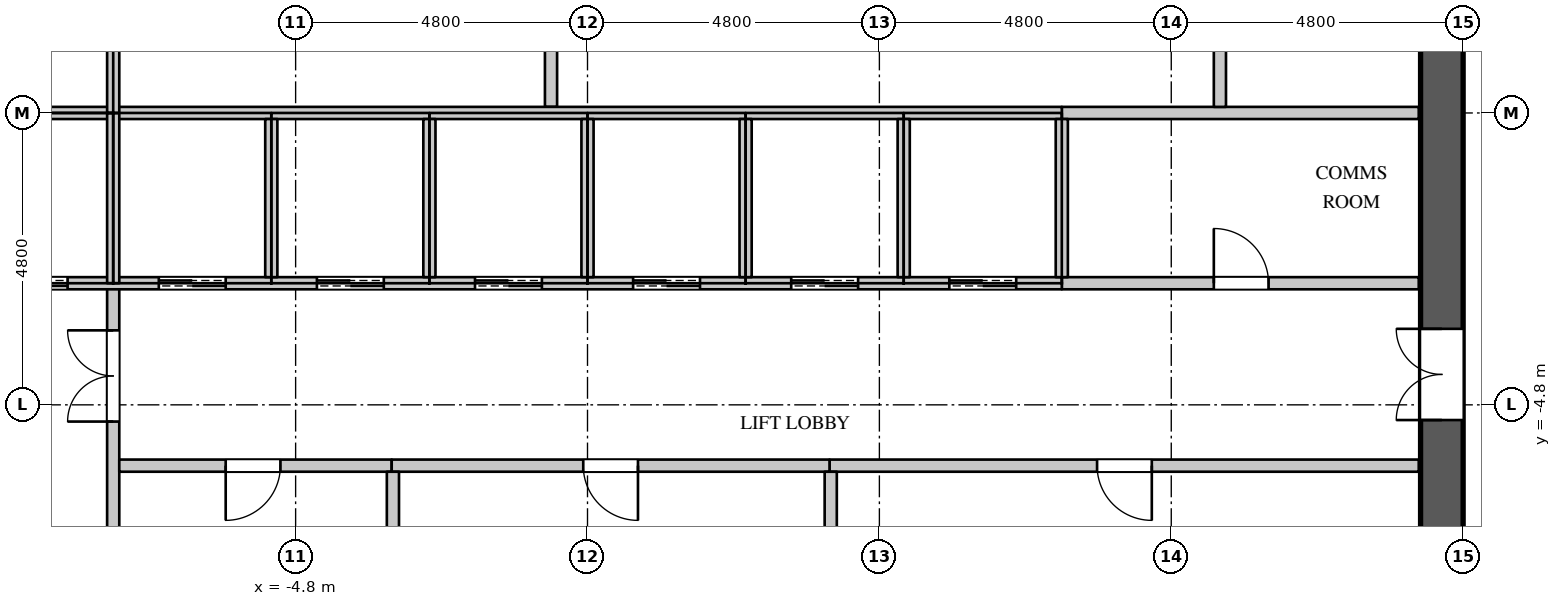
"""IFC4 building model, lengths in metres.
Left out: names, types, materials, properties, quantities, classifications, styles, units other than length and angle.
Written with IfcOpenShell. Run it as: python <this file> out.ifc"""

import sys

from ifc_helpers import new_model, si_unit, direction, frame, frame_2d, origin, place, context, subcontext, project, spatial, rectangle, extrude, element, fill, save


model = new_model("IFC4")
c1 = context("Model", 3, precision=1e-05, world=origin(), true_north=direction((0.0, 1.0)))
c2 = subcontext(c1, "Body", "Model", "MODEL_VIEW")
j1 = project(units=[si_unit("LENGTHUNIT", "METRE"), si_unit("PLANEANGLEUNIT", "RADIAN")], contexts=[c1])
p1 = place(None, origin())
s1 = spatial("IfcSite", under=j1, at=p1, CompositionType="ELEMENT")
p2 = place(p1, origin())
s2 = spatial("IfcBuilding", under=s1, at=p2, CompositionType="ELEMENT")
p3 = place(p2, frame((0.0, 0.0, 204.3)))
s3 = spatial("IfcBuildingStorey", under=s2, at=p3, CompositionType="ELEMENT", Elevation=204.3)
p4 = place(p3, frame((14.05, -11.3, 0.0), z_axis=(0.0, 0.0, 1.0), x_axis=(0.0, 1.0, 0.0)))
e1 = element("IfcWall", 1, at=p4, inside=s3, PredefinedType="SHEAR", context=c2, shape_type="SweptSolid", body=[
    extrude(rectangle(XDim=22.6, YDim=0.7, at=frame_2d((11.3, 0.0))), origin(), (0.0, 0.0, 1.0), 4.2),
])
p5 = place(p4, frame((20.35, 0.0, 0.0)))
e2 = element("IfcOpeningElement", 2, at=p5, cuts=e1, PredefinedType="OPENING", context=c2, shape_type="SweptSolid", body=[
    extrude(rectangle(XDim=1.1, YDim=2.2, at=frame_2d((0.55, 1.1))), frame((0.0, 0.36, 0.0), z_axis=(0.0, -1.0, 0.0), x_axis=(1.0, 0.0, 0.0)), (0.0, 0.0, 1.0), 0.72),
])
p6 = place(p4, frame((1.15, 0.0, 0.0)))
e3 = element("IfcOpeningElement", 3, at=p6, cuts=e1, PredefinedType="OPENING", context=c2, shape_type="SweptSolid", body=[
    extrude(rectangle(XDim=1.1, YDim=2.2, at=frame_2d((0.55, 1.1))), frame((0.0, 0.36, 0.0), z_axis=(0.0, -1.0, 0.0), x_axis=(1.0, 0.0, 0.0)), (0.0, 0.0, 1.0), 0.72),
])
p7 = place(p4, frame((14.85, 0.0, 0.0)))
e4 = element("IfcOpeningElement", 4, at=p7, cuts=e1, PredefinedType="OPENING", context=c2, shape_type="SweptSolid", body=[
    extrude(rectangle(XDim=1.5, YDim=2.4, at=frame_2d((0.75, 1.2))), frame((0.0, 0.36, 0.0), z_axis=(0.0, -1.0, 0.0), x_axis=(1.0, 0.0, 0.0)), (0.0, 0.0, 1.0), 0.72),
])
p8 = place(p4, frame((6.25, 0.0, 0.0)))
e5 = element("IfcOpeningElement", 5, at=p8, cuts=e1, PredefinedType="OPENING", context=c2, shape_type="SweptSolid", body=[
    extrude(rectangle(XDim=1.5, YDim=2.4, at=frame_2d((0.75, 1.2))), frame((0.0, 0.36, 0.0), z_axis=(0.0, -1.0, 0.0), x_axis=(1.0, 0.0, 0.0)), (0.0, 0.0, 1.0), 0.72),
])
p9 = place(p3, frame((-7.8, -8.075, 0.0), z_axis=(0.0, 0.0, 1.0), x_axis=(0.0, 1.0, 0.0)))
e6 = element("IfcWall", 6, at=p9, inside=s3, PredefinedType="PARTITIONING", context=c2, shape_type="SweptSolid", body=[
    extrude(rectangle(XDim=5.275, YDim=0.2, at=frame_2d((2.637, 0.0))), origin(), (0.0, 0.0, 1.0), 3.798),
])
p10 = place(p9, frame((3.0, 0.0, 0.0)))
e7 = element("IfcOpeningElement", 7, at=p10, cuts=e6, PredefinedType="OPENING", context=c2, shape_type="SweptSolid", body=[
    extrude(rectangle(XDim=1.5, YDim=2.4, at=frame_2d((0.75, 1.2))), frame((0.0, 0.11, 0.0), z_axis=(0.0, -1.0, 0.0), x_axis=(1.0, 0.0, 0.0)), (0.0, 0.0, 1.0), 0.22),
])
p11 = place(p3, frame((-7.7, -5.8, 0.0), z_axis=(0.0, 0.0, 1.0), x_axis=(1.0, 0.0, 0.0)))
e8 = element("IfcWall", 8, at=p11, inside=s3, PredefinedType="PARTITIONING", context=c2, shape_type="SweptSolid", body=[
    extrude(rectangle(XDim=4.48, YDim=0.2, at=frame_2d((2.24, 0.0))), origin(), (0.0, 0.0, 1.0), 3.798),
])
p12 = place(p11, frame((1.75, 0.0, 0.0)))
e9 = element("IfcOpeningElement", 9, at=p12, cuts=e8, PredefinedType="OPENING", context=c2, shape_type="SweptSolid", body=[
    extrude(rectangle(XDim=0.9, YDim=2.2, at=frame_2d((0.45, 1.1))), frame((0.0, 0.11, 0.0), z_axis=(0.0, -1.0, 0.0), x_axis=(1.0, 0.0, 0.0)), (0.0, 0.0, 1.0), 0.22),
])
p13 = place(p3, frame((3.98, -5.8, 0.0), z_axis=(0.0, 0.0, 1.0), x_axis=(1.0, 0.0, 0.0)))
e10 = element("IfcWall", 10, at=p13, inside=s3, PredefinedType="PARTITIONING", context=c2, shape_type="SweptSolid", body=[
    extrude(rectangle(XDim=9.69, YDim=0.2, at=frame_2d((4.845, 0.0))), origin(), (0.0, 0.0, 1.0), 3.798),
])
p14 = place(p13, frame((4.4, 0.0, 0.0)))
e11 = element("IfcOpeningElement", 11, at=p14, cuts=e10, PredefinedType="OPENING", context=c2, shape_type="SweptSolid", body=[
    extrude(rectangle(XDim=0.9, YDim=2.2, at=frame_2d((0.45, 1.1))), frame((0.0, 0.11, 0.0), z_axis=(0.0, -1.0, 0.0), x_axis=(1.0, 0.0, 0.0)), (0.0, 0.0, 1.0), 0.22),
])
p15 = place(p3, frame((-3.22, -5.8, 0.0), z_axis=(0.0, 0.0, 1.0), x_axis=(1.0, 0.0, 0.0)))
e12 = element("IfcWall", 12, at=p15, inside=s3, PredefinedType="PARTITIONING", context=c2, shape_type="SweptSolid", body=[
    extrude(rectangle(XDim=7.2, YDim=0.2, at=frame_2d((3.6, 0.0))), origin(), (0.0, 0.0, 1.0), 3.798),
])
p16 = place(p15, frame((3.15, 0.0, 0.0)))
e13 = element("IfcOpeningElement", 13, at=p16, cuts=e12, PredefinedType="OPENING", context=c2, shape_type="SweptSolid", body=[
    extrude(rectangle(XDim=0.9, YDim=2.2, at=frame_2d((0.45, 1.1))), frame((0.0, 0.11, 0.0), z_axis=(0.0, -1.0, 0.0), x_axis=(1.0, 0.0, 0.0)), (0.0, 0.0, 1.0), 0.22),
])
p17 = place(p3, frame((-3.2, -11.27, 0.0), z_axis=(0.0, 0.0, 1.0), x_axis=(0.0, 1.0, 0.0)))
e14 = element("IfcWall", 14, at=p17, inside=s3, PredefinedType="PARTITIONING", context=c2, shape_type="SweptSolid", body=[
    extrude(rectangle(XDim=5.37, YDim=0.2, at=frame_2d((2.685, 0.0))), origin(), (0.0, 0.0, 1.0), 3.798),
])
p18 = place(p3, frame((-0.6, 0.1, 0.0), z_axis=(0.0, 0.0, 1.0), x_axis=(0.0, 1.0, 0.0)))
e15 = element("IfcWall", 15, at=p18, inside=s3, PredefinedType="PARTITIONING", context=c2, shape_type="SweptSolid", body=[
    extrude(rectangle(XDim=2.6, YDim=0.2, at=frame_2d((1.3, 0.0))), origin(), (0.0, 0.0, 1.0), 3.798),
])
p19 = place(p3, frame((4.0, -11.27, 0.0), z_axis=(0.0, 0.0, 1.0), x_axis=(0.0, 1.0, 0.0)))
e16 = element("IfcWall", 16, at=p19, inside=s3, PredefinedType="PARTITIONING", context=c2, shape_type="SweptSolid", body=[
    extrude(rectangle(XDim=5.37, YDim=0.2, at=frame_2d((2.685, 0.0))), origin(), (0.0, 0.0, 1.0), 3.798),
])
p20 = place(p3, frame((7.8, -2.8, 0.0), z_axis=(0.0, 0.0, 1.0), x_axis=(1.0, 0.0, 0.0)))
e17 = element("IfcWall", 17, at=p20, inside=s3, PredefinedType="PARTITIONING", context=c2, shape_type="SweptSolid", body=[
    extrude(rectangle(XDim=5.87, YDim=0.2, at=frame_2d((2.935, 0.0))), origin(), (0.0, 0.0, 1.0), 3.798),
])
p21 = place(p20, frame((2.5, 0.0, 0.0)))
e18 = element("IfcOpeningElement", 18, at=p21, cuts=e17, PredefinedType="OPENING", context=c2, shape_type="SweptSolid", body=[
    extrude(rectangle(XDim=0.9, YDim=2.2, at=frame_2d((0.45, 1.1))), frame((0.0, 0.11, 0.0), z_axis=(0.0, -1.0, 0.0), x_axis=(1.0, 0.0, 0.0)), (0.0, 0.0, 1.0), 0.22),
])
p22 = place(p3, frame((7.8, 0.0, 0.0), z_axis=(0.0, 0.0, 1.0), x_axis=(1.0, 0.0, 0.0)))
e19 = element("IfcWall", 19, at=p22, inside=s3, PredefinedType="PARTITIONING", context=c2, shape_type="SweptSolid", body=[
    extrude(rectangle(XDim=5.87, YDim=0.2, at=frame_2d((2.935, 0.0))), origin(), (0.0, 0.0, 1.0), 3.798),
])
p23 = place(p3, frame((10.4, 0.1, 0.0), z_axis=(0.0, 0.0, 1.0), x_axis=(0.0, 1.0, 0.0)))
e20 = element("IfcWall", 20, at=p23, inside=s3, PredefinedType="PARTITIONING", context=c2, shape_type="SweptSolid", body=[
    extrude(rectangle(XDim=2.6, YDim=0.2, at=frame_2d((1.3, 0.0))), origin(), (0.0, 0.0, 1.0), 3.798),
])
p24 = place(p3, frame((-13.67, 0.0, 0.0), z_axis=(0.0, 0.0, 1.0), x_axis=(1.0, 0.0, 0.0)))
e21 = element("IfcWall", 21, at=p24, inside=s3, PredefinedType="PARTITIONING", context=c2, shape_type="SweptSolid", body=[
    extrude(rectangle(XDim=21.47, YDim=0.2, at=frame_2d((10.735, 0.0))), origin(), (0.0, 0.0, 1.0), 3.798),
])
p25 = place(p3, frame((-10.4, -2.8, 0.0), z_axis=(0.0, 0.0, 1.0), x_axis=(1.0, 0.0, 0.0)))
e22 = element("IfcWall", 22, at=p25, inside=s3, PredefinedType="PARTITIONING", context=c2, shape_type="SweptSolid", body=[
    extrude(rectangle(XDim=18.2, YDim=0.2, at=frame_2d((9.1, 0.0))), origin(), (0.0, 0.0, 1.0), 3.798),
])
p26 = place(p25, frame((0.75, 0.0, 0.0)))
e23 = element("IfcOpeningElement", 23, at=p26, cuts=e22, PredefinedType="OPENING", context=c2, shape_type="SweptSolid", body=[
    extrude(rectangle(XDim=1.1, YDim=2.2, at=frame_2d((0.55, 1.1))), frame((0.0, 0.11, 0.0), z_axis=(0.0, -1.0, 0.0), x_axis=(1.0, 0.0, 0.0)), (0.0, 0.0, 1.0), 0.22),
])
p27 = place(p25, frame((3.35, 0.0, 0.0)))
e24 = element("IfcOpeningElement", 24, at=p27, cuts=e22, PredefinedType="OPENING", context=c2, shape_type="SweptSolid", body=[
    extrude(rectangle(XDim=1.1, YDim=2.2, at=frame_2d((0.55, 1.1))), frame((0.0, 0.11, 0.0), z_axis=(0.0, -1.0, 0.0), x_axis=(1.0, 0.0, 0.0)), (0.0, 0.0, 1.0), 0.22),
])
p28 = place(p25, frame((5.95, 0.0, 0.0)))
e25 = element("IfcOpeningElement", 25, at=p28, cuts=e22, PredefinedType="OPENING", context=c2, shape_type="SweptSolid", body=[
    extrude(rectangle(XDim=1.1, YDim=2.2, at=frame_2d((0.55, 1.1))), frame((0.0, 0.11, 0.0), z_axis=(0.0, -1.0, 0.0), x_axis=(1.0, 0.0, 0.0)), (0.0, 0.0, 1.0), 0.22),
])
p29 = place(p25, frame((8.55, 0.0, 0.0)))
e26 = element("IfcOpeningElement", 26, at=p29, cuts=e22, PredefinedType="OPENING", context=c2, shape_type="SweptSolid", body=[
    extrude(rectangle(XDim=1.1, YDim=2.2, at=frame_2d((0.55, 1.1))), frame((0.0, 0.11, 0.0), z_axis=(0.0, -1.0, 0.0), x_axis=(1.0, 0.0, 0.0)), (0.0, 0.0, 1.0), 0.22),
])
p30 = place(p25, frame((11.15, 0.0, 0.0)))
e27 = element("IfcOpeningElement", 27, at=p30, cuts=e22, PredefinedType="OPENING", context=c2, shape_type="SweptSolid", body=[
    extrude(rectangle(XDim=1.1, YDim=2.2, at=frame_2d((0.55, 1.1))), frame((0.0, 0.11, 0.0), z_axis=(0.0, -1.0, 0.0), x_axis=(1.0, 0.0, 0.0)), (0.0, 0.0, 1.0), 0.22),
])
p31 = place(p25, frame((13.75, 0.0, 0.0)))
e28 = element("IfcOpeningElement", 28, at=p31, cuts=e22, PredefinedType="OPENING", context=c2, shape_type="SweptSolid", body=[
    extrude(rectangle(XDim=1.1, YDim=2.2, at=frame_2d((0.55, 1.1))), frame((0.0, 0.11, 0.0), z_axis=(0.0, -1.0, 0.0), x_axis=(1.0, 0.0, 0.0)), (0.0, 0.0, 1.0), 0.22),
])
p32 = place(p25, frame((16.35, 0.0, 0.0)))
e29 = element("IfcOpeningElement", 29, at=p32, cuts=e22, PredefinedType="OPENING", context=c2, shape_type="SweptSolid", body=[
    extrude(rectangle(XDim=1.1, YDim=2.2, at=frame_2d((0.55, 1.1))), frame((0.0, 0.11, 0.0), z_axis=(0.0, -1.0, 0.0), x_axis=(1.0, 0.0, 0.0)), (0.0, 0.0, 1.0), 0.22),
])
for number, where, z_axis, x_axis in (
    (30, (-7.8, -2.8, 0.0), (0.0, 0.0, 1.0), (0.0, 1.0, 0.0)),
    (31, (-7.8, 0.0, 0.0), (0.0, 0.0, 1.0), (0.0, 1.0, 0.0)),
):
    element("IfcWall", number, at=place(p3, frame(where, z_axis=z_axis, x_axis=x_axis)), inside=s3, PredefinedType="PARTITIONING", context=c2, shape_type="SweptSolid", body=[
        extrude(rectangle(XDim=2.8, YDim=0.2, at=frame_2d((1.4, 0.0))), origin(), (0.0, 0.0, 1.0), 3.798),
    ])
for number, where, z_axis, x_axis in (
    (32, (-5.2, -2.7, 0.0), (0.0, 0.0, 1.0), (0.0, 1.0, 0.0)),
    (33, (-2.6, -2.7, 0.0), (0.0, 0.0, 1.0), (0.0, 1.0, 0.0)),
    (34, (0.0, -2.7, 0.0), (0.0, 0.0, 1.0), (0.0, 1.0, 0.0)),
    (35, (2.6, -2.7, 0.0), (0.0, 0.0, 1.0), (0.0, 1.0, 0.0)),
    (36, (5.2, -2.7, 0.0), (0.0, 0.0, 1.0), (0.0, 1.0, 0.0)),
    (37, (7.8, -2.7, 0.0), (0.0, 0.0, 1.0), (0.0, 1.0, 0.0)),
):
    element("IfcWall", number, at=place(p3, frame(where, z_axis=z_axis, x_axis=x_axis)), inside=s3, PredefinedType="PARTITIONING", context=c2, shape_type="SweptSolid", body=[
        extrude(rectangle(XDim=2.6, YDim=0.2, at=frame_2d((1.3, 0.0))), origin(), (0.0, 0.0, 1.0), 3.798),
    ])
p33 = place(p21, origin())
e38 = element("IfcDoor", 38, at=p33, inside=s3, OperationType="SINGLE_SWING_LEFT", PredefinedType="DOOR", context=c2, shape_type="SweptSolid", body=[
    extrude(rectangle(XDim=0.9, YDim=2.2, at=frame_2d((0.45, 1.1))), frame((0.0, 0.025, 0.0), z_axis=(0.0, -1.0, 0.0), x_axis=(1.0, 0.0, 0.0)), (0.0, 0.0, 1.0), 0.05),
])
fill(e18, e38)
p34 = place(p12, origin())
e39 = element("IfcDoor", 39, at=p34, inside=s3, OperationType="SINGLE_SWING_RIGHT", PredefinedType="DOOR", context=c2, shape_type="SweptSolid", body=[
    extrude(rectangle(XDim=0.9, YDim=2.2, at=frame_2d((0.45, 1.1))), frame((0.0, 0.025, 0.0), z_axis=(0.0, -1.0, 0.0), x_axis=(1.0, 0.0, 0.0)), (0.0, 0.0, 1.0), 0.05),
])
fill(e9, e39)
p35 = place(p16, origin())
e40 = element("IfcDoor", 40, at=p35, inside=s3, OperationType="SINGLE_SWING_LEFT", PredefinedType="DOOR", context=c2, shape_type="SweptSolid", body=[
    extrude(rectangle(XDim=0.9, YDim=2.2, at=frame_2d((0.45, 1.1))), frame((0.0, 0.025, 0.0), z_axis=(0.0, -1.0, 0.0), x_axis=(1.0, 0.0, 0.0)), (0.0, 0.0, 1.0), 0.05),
])
fill(e13, e40)
p36 = place(p14, origin())
e41 = element("IfcDoor", 41, at=p36, inside=s3, OperationType="SINGLE_SWING_LEFT", PredefinedType="DOOR", context=c2, shape_type="SweptSolid", body=[
    extrude(rectangle(XDim=0.9, YDim=2.2, at=frame_2d((0.45, 1.1))), frame((0.0, 0.025, 0.0), z_axis=(0.0, -1.0, 0.0), x_axis=(1.0, 0.0, 0.0)), (0.0, 0.0, 1.0), 0.05),
])
fill(e11, e41)
p37 = place(p26, origin())
e42 = element("IfcDoor", 42, at=p37, inside=s3, OperationType="DOUBLE_DOOR_SLIDING", PredefinedType="DOOR", context=c2, shape_type="SweptSolid", body=[
    extrude(rectangle(XDim=1.1, YDim=2.2, at=frame_2d((0.55, 1.1))), frame((0.0, 0.025, 0.0), z_axis=(0.0, -1.0, 0.0), x_axis=(1.0, 0.0, 0.0)), (0.0, 0.0, 1.0), 0.05),
])
fill(e23, e42)
p38 = place(p27, origin())
e43 = element("IfcDoor", 43, at=p38, inside=s3, OperationType="DOUBLE_DOOR_SLIDING", PredefinedType="DOOR", context=c2, shape_type="SweptSolid", body=[
    extrude(rectangle(XDim=1.1, YDim=2.2, at=frame_2d((0.55, 1.1))), frame((0.0, 0.025, 0.0), z_axis=(0.0, -1.0, 0.0), x_axis=(1.0, 0.0, 0.0)), (0.0, 0.0, 1.0), 0.05),
])
fill(e24, e43)
p39 = place(p28, origin())
e44 = element("IfcDoor", 44, at=p39, inside=s3, OperationType="DOUBLE_DOOR_SLIDING", PredefinedType="DOOR", context=c2, shape_type="SweptSolid", body=[
    extrude(rectangle(XDim=1.1, YDim=2.2, at=frame_2d((0.55, 1.1))), frame((0.0, 0.025, 0.0), z_axis=(0.0, -1.0, 0.0), x_axis=(1.0, 0.0, 0.0)), (0.0, 0.0, 1.0), 0.05),
])
fill(e25, e44)
p40 = place(p29, origin())
e45 = element("IfcDoor", 45, at=p40, inside=s3, OperationType="DOUBLE_DOOR_SLIDING", PredefinedType="DOOR", context=c2, shape_type="SweptSolid", body=[
    extrude(rectangle(XDim=1.1, YDim=2.2, at=frame_2d((0.55, 1.1))), frame((0.0, 0.025, 0.0), z_axis=(0.0, -1.0, 0.0), x_axis=(1.0, 0.0, 0.0)), (0.0, 0.0, 1.0), 0.05),
])
fill(e26, e45)
p41 = place(p30, origin())
e46 = element("IfcDoor", 46, at=p41, inside=s3, OperationType="DOUBLE_DOOR_SLIDING", PredefinedType="DOOR", context=c2, shape_type="SweptSolid", body=[
    extrude(rectangle(XDim=1.1, YDim=2.2, at=frame_2d((0.55, 1.1))), frame((0.0, 0.025, 0.0), z_axis=(0.0, -1.0, 0.0), x_axis=(1.0, 0.0, 0.0)), (0.0, 0.0, 1.0), 0.05),
])
fill(e27, e46)
p42 = place(p31, origin())
e47 = element("IfcDoor", 47, at=p42, inside=s3, OperationType="DOUBLE_DOOR_SLIDING", PredefinedType="DOOR", context=c2, shape_type="SweptSolid", body=[
    extrude(rectangle(XDim=1.1, YDim=2.2, at=frame_2d((0.55, 1.1))), frame((0.0, 0.025, 0.0), z_axis=(0.0, -1.0, 0.0), x_axis=(1.0, 0.0, 0.0)), (0.0, 0.0, 1.0), 0.05),
])
fill(e28, e47)
p43 = place(p32, origin())
e48 = element("IfcDoor", 48, at=p43, inside=s3, OperationType="DOUBLE_DOOR_SLIDING", PredefinedType="DOOR", context=c2, shape_type="SweptSolid", body=[
    extrude(rectangle(XDim=1.1, YDim=2.2, at=frame_2d((0.55, 1.1))), frame((0.0, 0.025, 0.0), z_axis=(0.0, -1.0, 0.0), x_axis=(1.0, 0.0, 0.0)), (0.0, 0.0, 1.0), 0.05),
])
fill(e29, e48)
p44 = place(p10, origin())
e49 = element("IfcDoor", 49, at=p44, inside=s3, OperationType="DOUBLE_DOOR_SINGLE_SWING", PredefinedType="DOOR", context=c2, shape_type="SweptSolid", body=[
    extrude(rectangle(XDim=1.5, YDim=2.4, at=frame_2d((0.75, 1.2))), frame((0.0, 0.025, 0.0), z_axis=(0.0, -1.0, 0.0), x_axis=(1.0, 0.0, 0.0)), (0.0, 0.0, 1.0), 0.05),
])
fill(e7, e49)
p45 = place(p8, origin())
e50 = element("IfcDoor", 50, at=p45, inside=s3, OperationType="DOUBLE_DOOR_SINGLE_SWING", PredefinedType="DOOR", context=c2, shape_type="SweptSolid", body=[
    extrude(rectangle(XDim=1.5, YDim=2.4, at=frame_2d((0.75, 1.2))), frame((0.0, 0.345, 0.0), z_axis=(0.0, -1.0, 0.0), x_axis=(1.0, 0.0, 0.0)), (0.0, 0.0, 1.0), 0.05),
])
fill(e5, e50)
save(model, sys.argv[1])
